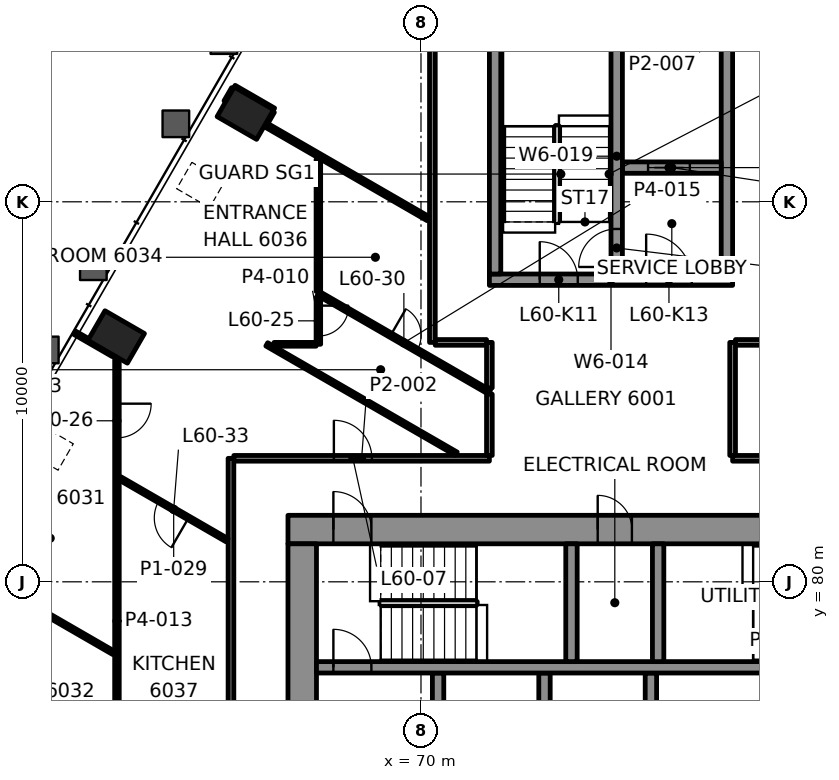
"""IFC4 building model, lengths in metres.
Left out: names, types, materials, properties, quantities, classifications, styles, units other than length and angle.
Written with IfcOpenShell. Run it as: python <this file> out.ifc"""

import sys

from ifc_helpers import new_model, si_unit, direction, frame, frame_2d, origin, origin_2d, place, context, subcontext, project, spatial, rectangle, hollow_rectangle, extrude, element, fill, save


model = new_model("IFC4")
c1 = context("Model", 3, precision=1e-05, world=origin(), true_north=direction((0.0, 1.0)))
c2 = subcontext(c1, "Body", "Model", "MODEL_VIEW")
j1 = project(units=[si_unit("LENGTHUNIT", "METRE"), si_unit("PLANEANGLEUNIT", "RADIAN")], contexts=[c1])
p1 = place(None, origin())
s1 = spatial("IfcSite", under=j1, at=p1, CompositionType="ELEMENT")
p2 = place(p1, origin())
s2 = spatial("IfcBuilding", under=s1, at=p2, CompositionType="ELEMENT")
p3 = place(p2, frame((0.0, 0.0, 256.6)))
s3 = spatial("IfcBuildingStorey", under=s2, at=p3, CompositionType="ELEMENT", Elevation=256.6)
for number, where, z_axis, x_axis in (
    (1, (65.379, 92.332, -0.0), (0.0, 0.0, 1.0), (-0.5, -0.866, 0.0)),
    (2, (61.979, 86.443, -0.0), (0.0, 0.0, 1.0), (-0.5, -0.866, 0.0)),
):
    element("IfcColumn", number, at=place(p3, frame(where, z_axis=z_axis, x_axis=x_axis)), inside=s3, PredefinedType="COLUMN", context=c2, shape_type="SweptSolid", body=[
        extrude(hollow_rectangle(XDim=0.9, YDim=1.2, WallThickness=0.06, at=origin_2d()), origin(), (0.0, 0.0, 1.0), 3.5),
    ])
p4 = place(p3, frame((66.5, 81.375, 0.0), z_axis=(0.0, 0.0, 1.0), x_axis=(1.0, 0.0, 0.0)))
e3 = element("IfcWall", 3, at=p4, inside=s3, PredefinedType="SHEAR", context=c2, shape_type="SweptSolid", body=[
    extrude(rectangle(XDim=17.0, YDim=0.75, at=frame_2d((8.5, 0.0))), origin(), (0.0, 0.0, 1.0), 3.3),
])
p5 = place(p4, frame((1.195, 0.0, 0.0)))
e4 = element("IfcOpeningElement", 4, at=p5, cuts=e3, PredefinedType="OPENING", context=c2, shape_type="SweptSolid", body=[
    extrude(rectangle(XDim=1.0, YDim=2.1, at=frame_2d((0.5, 1.05))), frame((0.0, 0.385, 0.0), z_axis=(0.0, -1.0, 0.0), x_axis=(1.0, 0.0, 0.0)), (0.0, 0.0, 1.0), 0.77),
])
p6 = place(p4, frame((15.005, 0.0, 0.0)))
e5 = element("IfcOpeningElement", 5, at=p6, cuts=e3, PredefinedType="OPENING", context=c2, shape_type="SweptSolid", body=[
    extrude(rectangle(XDim=1.0, YDim=2.1, at=frame_2d((0.5, 1.05))), frame((0.0, 0.385, 0.0), z_axis=(0.0, -1.0, 0.0), x_axis=(1.0, 0.0, 0.0)), (0.0, 0.0, 1.0), 0.77),
])
p7 = place(p4, frame((8.15, 0.0, 0.0)))
e6 = element("IfcOpeningElement", 6, at=p7, cuts=e3, PredefinedType="OPENING", context=c2, shape_type="SweptSolid", body=[
    extrude(rectangle(XDim=0.9, YDim=2.1, at=frame_2d((0.45, 1.05))), frame((0.0, 0.385, 0.0), z_axis=(0.0, -1.0, 0.0), x_axis=(1.0, 0.0, 0.0)), (0.0, 0.0, 1.0), 0.77),
])
p8 = place(p3, frame((66.875, 69.0, 0.0), z_axis=(0.0, 0.0, 1.0), x_axis=(0.0, 1.0, 0.0)))
e7 = element("IfcWall", 7, at=p8, inside=s3, PredefinedType="SHEAR", context=c2, shape_type="SweptSolid", body=[
    extrude(rectangle(XDim=12.0, YDim=0.75, at=frame_2d((6.0, 0.0))), origin(), (0.0, 0.0, 1.0), 3.3),
])
p9 = place(p8, frame((3.7, 0.0, 0.0)))
e8 = element("IfcOpeningElement", 8, at=p9, cuts=e7, PredefinedType="OPENING", context=c2, shape_type="SweptSolid", body=[
    extrude(rectangle(XDim=1.2, YDim=2.1, at=frame_2d((0.6, 1.05))), frame((0.0, 0.385, 0.0), z_axis=(0.0, -1.0, 0.0), x_axis=(1.0, 0.0, 0.0)), (0.0, 0.0, 1.0), 0.77),
])
p10 = place(p3, frame((70.45, 75.0, 0.0), z_axis=(0.0, 0.0, 1.0), x_axis=(0.0, 1.0, 0.0)))
e9 = element("IfcWall", 9, at=p10, inside=s3, PredefinedType="SHEAR", context=c2, shape_type="SweptSolid", body=[
    extrude(rectangle(XDim=2.6, YDim=0.3, at=frame_2d((1.3, 0.0))), origin(), (0.0, 0.0, 1.0), 3.3),
])
p11 = place(p10, frame((0.15, 0.0, 0.0)))
e10 = element("IfcOpeningElement", 10, at=p11, cuts=e9, PredefinedType="OPENING", context=c2, shape_type="SweptSolid", body=[
    extrude(rectangle(XDim=1.1, YDim=2.1, at=frame_2d((0.55, 1.05))), frame((0.0, 0.16, 0.0), z_axis=(0.0, -1.0, 0.0), x_axis=(1.0, 0.0, 0.0)), (0.0, 0.0, 1.0), 0.32),
])
for number, where, z_axis, x_axis in (
    (11, (73.25, 75.0, 0.0), (0.0, 0.0, 1.0), (0.0, 1.0, 0.0)),
    (12, (76.05, 75.0, 0.0), (0.0, 0.0, 1.0), (0.0, 1.0, 0.0)),
):
    element("IfcWall", number, at=place(p3, frame(where, z_axis=z_axis, x_axis=x_axis)), inside=s3, PredefinedType="SHEAR", context=c2, shape_type="SweptSolid", body=[
        extrude(rectangle(XDim=2.6, YDim=0.3, at=frame_2d((1.3, 0.0))), origin(), (0.0, 0.0, 1.0), 3.3),
    ])
p12 = place(p3, frame((67.25, 77.75, 0.0), z_axis=(0.0, 0.0, 1.0), x_axis=(1.0, 0.0, 0.0)))
e13 = element("IfcWall", 13, at=p12, inside=s3, PredefinedType="SHEAR", context=c2, shape_type="SweptSolid", body=[
    extrude(rectangle(XDim=15.5, YDim=0.3, at=frame_2d((7.75, 0.0))), origin(), (0.0, 0.0, 1.0), 3.3),
])
p13 = place(p12, frame((0.445, 0.0, 0.0)))
e14 = element("IfcOpeningElement", 14, at=p13, cuts=e13, PredefinedType="OPENING", context=c2, shape_type="SweptSolid", body=[
    extrude(rectangle(XDim=1.0, YDim=2.1, at=frame_2d((0.5, 1.05))), frame((0.0, 0.16, 0.0), z_axis=(0.0, -1.0, 0.0), x_axis=(1.0, 0.0, 0.0)), (0.0, 0.0, 1.0), 0.32),
])
for number, where, z_axis, x_axis in (
    (15, (73.96, 77.9, 0.0), (0.0, 0.0, 1.0), (0.0, 1.0, 0.0)),
    (16, (76.24, 77.9, 0.0), (0.0, 0.0, 1.0), (0.0, 1.0, 0.0)),
):
    element("IfcWall", number, at=place(p3, frame(where, z_axis=z_axis, x_axis=x_axis)), inside=s3, PredefinedType="SHEAR", context=c2, shape_type="SweptSolid", body=[
        extrude(rectangle(XDim=3.1, YDim=0.3, at=frame_2d((1.55, 0.0))), origin(), (0.0, 0.0, 1.0), 3.3),
    ])
p14 = place(p3, frame((71.8, 87.95, 0.0), z_axis=(0.0, 0.0, 1.0), x_axis=(1.0, 0.0, 0.0)))
e17 = element("IfcWall", 17, at=p14, inside=s3, PredefinedType="SHEAR", context=c2, shape_type="SweptSolid", body=[
    extrude(rectangle(XDim=6.4, YDim=0.3, at=frame_2d((3.2, 0.0))), origin(), (0.0, 0.0, 1.0), 3.3),
])
p15 = place(p14, frame((1.325, 0.0, 0.0)))
e18 = element("IfcOpeningElement", 18, at=p15, cuts=e17, PredefinedType="OPENING", context=c2, shape_type="SweptSolid", body=[
    extrude(rectangle(XDim=1.0, YDim=2.1, at=frame_2d((0.5, 1.05))), frame((0.0, 0.16, 0.0), z_axis=(0.0, -1.0, 0.0), x_axis=(1.0, 0.0, 0.0)), (0.0, 0.0, 1.0), 0.32),
])
p16 = place(p14, frame((4.125, 0.0, 0.0)))
e19 = element("IfcOpeningElement", 19, at=p16, cuts=e17, PredefinedType="OPENING", context=c2, shape_type="SweptSolid", body=[
    extrude(rectangle(XDim=1.2, YDim=2.1, at=frame_2d((0.6, 1.05))), frame((0.0, 0.16, 0.0), z_axis=(0.0, -1.0, 0.0), x_axis=(1.0, 0.0, 0.0)), (0.0, 0.0, 1.0), 0.32),
])
for number, where, z_axis, x_axis in (
    (20, (71.95, 88.1, 0.0), (0.0, 0.0, 1.0), (0.0, 1.0, 0.0)),
    (21, (78.05, 88.1, 0.0), (0.0, 0.0, 1.0), (0.0, 1.0, 0.0)),
):
    element("IfcWall", number, at=place(p3, frame(where, z_axis=z_axis, x_axis=x_axis)), inside=s3, PredefinedType="SHEAR", context=c2, shape_type="SweptSolid", body=[
        extrude(rectangle(XDim=6.2, YDim=0.3, at=frame_2d((3.1, 0.0))), origin(), (0.0, 0.0, 1.0), 3.3),
    ])
p17 = place(p3, frame((75.3, 90.9, 0.0), z_axis=(0.0, 0.0, 1.0), x_axis=(1.0, 0.0, 0.0)))
e22 = element("IfcWall", 22, at=p17, inside=s3, PredefinedType="SHEAR", context=c2, shape_type="SweptSolid", body=[
    extrude(rectangle(XDim=2.6, YDim=0.3, at=frame_2d((1.3, 0.0))), origin(), (0.0, 0.0, 1.0), 3.3),
])
p18 = place(p17, frame((0.675, 0.0, 0.0)))
e23 = element("IfcOpeningElement", 23, at=p18, cuts=e22, PredefinedType="OPENING", context=c2, shape_type="SweptSolid", body=[
    extrude(rectangle(XDim=1.1, YDim=2.1, at=frame_2d((0.55, 1.05))), frame((0.0, 0.16, 0.0), z_axis=(0.0, -1.0, 0.0), x_axis=(1.0, 0.0, 0.0)), (0.0, 0.0, 1.0), 0.32),
])
p19 = place(p3, frame((75.15, 88.1, 0.0), z_axis=(0.0, 0.0, 1.0), x_axis=(0.0, 1.0, 0.0)))
e24 = element("IfcWall", 24, at=p19, inside=s3, PredefinedType="SHEAR", context=c2, shape_type="SweptSolid", body=[
    extrude(rectangle(XDim=6.2, YDim=0.3, at=frame_2d((3.1, 0.0))), origin(), (0.0, 0.0, 1.0), 3.3),
])
p20 = place(p19, frame((0.185, 0.0, 0.0)))
e25 = element("IfcOpeningElement", 25, at=p20, cuts=e24, PredefinedType="OPENING", context=c2, shape_type="SweptSolid", body=[
    extrude(rectangle(XDim=1.0, YDim=2.1, at=frame_2d((0.5, 1.05))), frame((0.0, 0.16, 0.0), z_axis=(0.0, -1.0, 0.0), x_axis=(1.0, 0.0, 0.0)), (0.0, 0.0, 1.0), 0.32),
])
p21 = place(p3, frame((65.075, 83.25, 0.0), z_axis=(0.0, 0.0, 1.0), x_axis=(1.0, 0.0, 0.0)))
e26 = element("IfcWall", 26, at=p21, inside=s3, PredefinedType="PARTITIONING", context=c2, shape_type="SweptSolid", body=[
    extrude(rectangle(XDim=6.725, YDim=0.15, at=frame_2d((3.362, 0.0))), origin(), (0.0, 0.0, 1.0), 2.7),
])
p22 = place(p21, frame((2.632, 0.0, 0.0)))
e27 = element("IfcOpeningElement", 27, at=p22, cuts=e26, PredefinedType="OPENING", context=c2, shape_type="SweptSolid", body=[
    extrude(rectangle(XDim=1.0, YDim=2.1, at=frame_2d((0.5, 1.05))), frame((0.0, 0.085, 0.0), z_axis=(0.0, -1.0, 0.0), x_axis=(1.0, 0.0, 0.0)), (0.0, 0.0, 1.0), 0.17),
])
p23 = place(p3, frame((78.2, 83.25, 0.0), z_axis=(0.0, 0.0, 1.0), x_axis=(1.0, 0.0, 0.0)))
e28 = element("IfcWall", 28, at=p23, inside=s3, PredefinedType="PARTITIONING", context=c2, shape_type="SweptSolid", body=[
    extrude(rectangle(XDim=6.725, YDim=0.15, at=frame_2d((3.362, 0.0))), origin(), (0.0, 0.0, 1.0), 2.7),
])
p24 = place(p23, frame((2.862, 0.0, 0.0)))
e29 = element("IfcOpeningElement", 29, at=p24, cuts=e28, PredefinedType="OPENING", context=c2, shape_type="SweptSolid", body=[
    extrude(rectangle(XDim=1.0, YDim=2.1, at=frame_2d((0.5, 1.05))), frame((0.0, 0.085, 0.0), z_axis=(0.0, -1.0, 0.0), x_axis=(1.0, 0.0, 0.0)), (0.0, 0.0, 1.0), 0.17),
])
p25 = place(p3, frame((66.133, 86.25, 0.0), z_axis=(0.0, 0.0, 1.0), x_axis=(1.0, 0.0, 0.0)))
e30 = element("IfcWall", 30, at=p25, inside=s3, PredefinedType="PARTITIONING", context=c2, shape_type="SweptSolid", body=[
    extrude(rectangle(XDim=1.106, YDim=0.1, at=frame_2d((0.553, 0.0))), origin(), (0.0, 0.0, 1.0), 2.7),
])
p26 = place(p3, frame((70.375, 86.3, 0.0), z_axis=(0.0, 0.0, 1.0), x_axis=(1.0, 0.0, 0.0)))
e31 = element("IfcWall", 31, at=p26, inside=s3, PredefinedType="PARTITIONING", context=c2, shape_type="SweptSolid", body=[
    extrude(rectangle(XDim=1.35, YDim=0.15, at=frame_2d((0.675, 0.0))), origin(), (0.0, 0.0, 1.0), 2.7),
])
p27 = place(p3, frame((78.275, 86.3, 0.0), z_axis=(0.0, 0.0, 1.0), x_axis=(1.0, 0.0, 0.0)))
e32 = element("IfcWall", 32, at=p27, inside=s3, PredefinedType="PARTITIONING", context=c2, shape_type="SweptSolid", body=[
    extrude(rectangle(XDim=1.35, YDim=0.15, at=frame_2d((0.675, 0.0))), origin(), (0.0, 0.0, 1.0), 2.7),
])
p28 = place(p3, frame((65.929, 92.085, 0.0), z_axis=(0.0, 0.0, 1.0), x_axis=(0.49970167553, 0.866197573001, 0.0)))
e33 = element("IfcWall", 33, at=p28, inside=s3, PredefinedType="PARTITIONING", context=c2, shape_type="SweptSolid", body=[
    extrude(rectangle(XDim=0.339, YDim=0.1, at=frame_2d((0.169, 0.0))), origin(), (0.0, 0.0, 1.0), 2.7),
])
p29 = place(p3, frame((64.86, 92.633, 0.0), z_axis=(0.0, 0.0, 1.0), x_axis=(0.500481453673, 0.865747257882, 0.0)))
e34 = element("IfcWall", 34, at=p29, inside=s3, PredefinedType="PARTITIONING", context=c2, shape_type="SweptSolid", body=[
    extrude(rectangle(XDim=0.399, YDim=0.1, at=frame_2d((0.199, 0.0))), origin(), (0.0, 0.0, 1.0), 2.7),
])
p30 = place(p3, frame((78.2, 83.325, 0.0), z_axis=(0.0, 0.0, 1.0), x_axis=(0.0, 1.0, 0.0)))
e35 = element("IfcWall", 35, at=p30, inside=s3, PredefinedType="PARTITIONING", context=c2, shape_type="SweptSolid", body=[
    extrude(rectangle(XDim=2.975, YDim=0.15, at=frame_2d((1.488, 0.0))), origin(), (0.0, 0.0, 1.0), 2.622),
])
p31 = place(p3, frame((71.8, 83.325, 0.0), z_axis=(0.0, 0.0, 1.0), x_axis=(0.0, 1.0, 0.0)))
e36 = element("IfcWall", 36, at=p31, inside=s3, PredefinedType="PARTITIONING", context=c2, shape_type="SweptSolid", body=[
    extrude(rectangle(XDim=1.614, YDim=0.15, at=frame_2d((0.807, 0.0))), origin(), (0.0, 0.0, 1.0), 2.622),
])
p32 = place(p3, frame((70.3, 86.3, 0.0), z_axis=(0.0, 0.0, 1.0), x_axis=(0.0, 1.0, 0.0)))
e37 = element("IfcWall", 37, at=p32, inside=s3, PredefinedType="PARTITIONING", context=c2, shape_type="SweptSolid", body=[
    extrude(rectangle(XDim=9.8, YDim=0.15, at=frame_2d((4.9, 0.0))), origin(), (0.0, 0.0, 1.0), 2.7),
])
p33 = place(p3, frame((67.3, 87.485, 0.0), z_axis=(0.0, 0.0, 1.0), x_axis=(0.0, -1.0, 0.0)))
e38 = element("IfcWall", 38, at=p33, inside=s3, PredefinedType="PARTITIONING", context=c2, shape_type="SweptSolid", body=[
    extrude(rectangle(XDim=1.234, YDim=0.12, at=frame_2d((0.617, 0.0))), origin(), (0.0, 0.0, 1.0), 2.622),
])
p34 = place(p33, frame((0.217, 0.0, 0.0)))
e39 = element("IfcOpeningElement", 39, at=p34, cuts=e38, PredefinedType="OPENING", context=c2, shape_type="SweptSolid", body=[
    extrude(rectangle(XDim=0.8, YDim=2.1, at=frame_2d((0.4, 1.05))), frame((0.0, 0.07, 0.0), z_axis=(0.0, -1.0, 0.0), x_axis=(1.0, 0.0, 0.0)), (0.0, 0.0, 1.0), 0.14),
])
p35 = place(p3, frame((65.0, 70.352, 0.0), z_axis=(0.0, 0.0, 1.0), x_axis=(0.0, 1.0, 0.0)))
e40 = element("IfcWall", 40, at=p35, inside=s3, PredefinedType="PARTITIONING", context=c2, shape_type="SweptSolid", body=[
    extrude(rectangle(XDim=12.897, YDim=0.15, at=frame_2d((6.449, 0.0))), origin(), (0.0, 0.0, 1.0), 2.7),
])
p36 = place(p3, frame((62.0, 85.912, 0.0), z_axis=(0.0, 0.0, 1.0), x_axis=(0.0, -1.0, 0.0)))
e41 = element("IfcWall", 41, at=p36, inside=s3, PredefinedType="PARTITIONING", context=c2, shape_type="SweptSolid", body=[
    extrude(rectangle(XDim=13.888, YDim=0.12, at=frame_2d((6.944, 0.0))), origin(), (0.0, 0.0, 1.0), 2.7),
])
p37 = place(p36, frame((1.224, 0.0, 0.0)))
e42 = element("IfcOpeningElement", 42, at=p37, cuts=e41, PredefinedType="OPENING", context=c2, shape_type="SweptSolid", body=[
    extrude(rectangle(XDim=0.9, YDim=2.1, at=frame_2d((0.45, 1.05))), frame((0.0, 0.07, 0.0), z_axis=(0.0, -1.0, 0.0), x_axis=(1.0, 0.0, 0.0)), (0.0, 0.0, 1.0), 0.14),
])
p38 = place(p36, frame((9.49, 0.0, 0.0)))
e43 = element("IfcOpeningElement", 43, at=p38, cuts=e41, PredefinedType="OPENING", context=c2, shape_type="SweptSolid", body=[
    extrude(rectangle(XDim=0.9, YDim=2.1, at=frame_2d((0.45, 1.05))), frame((0.0, 0.07, 0.0), z_axis=(0.0, -1.0, 0.0), x_axis=(1.0, 0.0, 0.0)), (0.0, 0.0, 1.0), 0.14),
])
p39 = place(p36, frame((12.466, 0.0, 0.0)))
e44 = element("IfcOpeningElement", 44, at=p39, cuts=e41, PredefinedType="OPENING", context=c2, shape_type="SweptSolid", body=[
    extrude(rectangle(XDim=0.8, YDim=2.1, at=frame_2d((0.4, 1.05))), frame((0.0, 0.07, 0.0), z_axis=(0.0, -1.0, 0.0), x_axis=(1.0, 0.0, 0.0)), (0.0, 0.0, 1.0), 0.14),
])
p40 = place(p3, frame((66.124, 92.422, 0.0), z_axis=(0.0, 0.0, 1.0), x_axis=(-0.865978732077, 0.500080829057, 0.0)))
e45 = element("IfcWall", 45, at=p40, inside=s3, PredefinedType="PARTITIONING", context=c2, shape_type="SweptSolid", body=[
    extrude(rectangle(XDim=1.199, YDim=0.1, at=frame_2d((0.6, 0.0))), origin(), (0.0, 0.0, 1.0), 2.688),
])
p41 = place(p3, frame((70.19, 89.555, 0.0), z_axis=(0.0, 0.0, 1.0), x_axis=(-0.866036249428, 0.499981214323, 0.0)))
e46 = element("IfcWall", 46, at=p41, inside=s3, PredefinedType="PARTITIONING", context=c2, shape_type="SweptSolid", body=[
    extrude(rectangle(XDim=4.955, YDim=0.12, at=frame_2d((2.478, 0.0))), origin(), (0.0, 0.0, 1.0), 2.7),
])
p42 = place(p3, frame((67.3, 87.589, 0.0), z_axis=(0.0, 0.0, 1.0), x_axis=(0.866019710441, -0.50000986103, 0.0)))
e47 = element("IfcWall", 47, at=p42, inside=s3, PredefinedType="PARTITIONING", context=c2, shape_type="SweptSolid", body=[
    extrude(rectangle(XDim=5.196, YDim=0.12, at=frame_2d((2.598, 0.0))), origin(), (0.0, 0.0, 1.0), 2.7),
])
p43 = place(p42, frame((2.198, 0.0, 0.0)))
e48 = element("IfcOpeningElement", 48, at=p43, cuts=e47, PredefinedType="OPENING", context=c2, shape_type="SweptSolid", body=[
    extrude(rectangle(XDim=0.8, YDim=2.1, at=frame_2d((0.4, 1.05))), frame((0.0, 0.07, 0.0), z_axis=(0.0, -1.0, 0.0), x_axis=(1.0, 0.0, 0.0)), (0.0, 0.0, 1.0), 0.14),
])
p44 = place(p3, frame((70.929, 83.37, 0.0), z_axis=(0.0, 0.0, 1.0), x_axis=(-0.866032366698, 0.499987939687, 0.0)))
e49 = element("IfcWall", 49, at=p44, inside=s3, PredefinedType="PARTITIONING", context=c2, shape_type="SweptSolid", body=[
    extrude(rectangle(XDim=5.758, YDim=0.1, at=frame_2d((2.879, 0.0))), origin(), (0.0, 0.0, 1.0), 2.7),
])
p45 = place(p3, frame((61.901, 85.969, 0.0), z_axis=(0.0, 0.0, 1.0), x_axis=(-0.866102146699, 0.499867053809, 0.0)))
e50 = element("IfcWall", 50, at=p45, inside=s3, PredefinedType="PARTITIONING", context=c2, shape_type="SweptSolid", body=[
    extrude(rectangle(XDim=1.169, YDim=0.1, at=frame_2d((0.584, 0.0))), origin(), (0.0, 0.0, 1.0), 2.688),
])
p46 = place(p3, frame((64.899, 81.094, 0.0), z_axis=(0.0, 0.0, 1.0), x_axis=(-0.866032882975, 0.499987045439, 0.0)))
e51 = element("IfcWall", 51, at=p46, inside=s3, PredefinedType="PARTITIONING", context=c2, shape_type="SweptSolid", body=[
    extrude(rectangle(XDim=3.248, YDim=0.1, at=frame_2d((1.624, 0.0))), origin(), (0.0, 0.0, 1.0), 2.7),
])
p47 = place(p46, frame((1.174, 0.0, 0.0)))
e52 = element("IfcOpeningElement", 52, at=p47, cuts=e51, PredefinedType="OPENING", context=c2, shape_type="SweptSolid", body=[
    extrude(rectangle(XDim=0.9, YDim=2.1, at=frame_2d((0.45, 1.05))), frame((0.0, 0.06, 0.0), z_axis=(0.0, -1.0, 0.0), x_axis=(1.0, 0.0, 0.0)), (0.0, 0.0, 1.0), 0.12),
])
p48 = place(p3, frame((61.914, 78.129, 0.0), z_axis=(0.0, 0.0, 1.0), x_axis=(-0.866011380966, 0.500024287448, 0.0)))
e53 = element("IfcWall", 53, at=p48, inside=s3, PredefinedType="PARTITIONING", context=c2, shape_type="SweptSolid", body=[
    extrude(rectangle(XDim=3.501, YDim=0.1, at=frame_2d((1.75, 0.0))), origin(), (0.0, 0.0, 1.0), 2.7),
])
p49 = place(p3, frame((71.8, 85.103, 0.0), z_axis=(0.0, 0.0, 1.0), x_axis=(0.0, 1.0, 0.0)))
e54 = element("IfcWall", 54, at=p49, inside=s3, PredefinedType="PARTITIONING", context=c2, shape_type="SweptSolid", body=[
    extrude(rectangle(XDim=1.197, YDim=0.15, at=frame_2d((0.598, 0.0))), origin(), (0.0, 0.0, 1.0), 2.7),
])
p50 = place(p3, frame((67.3, 87.641, 0.0), z_axis=(0.0, 0.0, 1.0), x_axis=(0.0, 1.0, 0.0)))
e55 = element("IfcWall", 55, at=p50, inside=s3, PredefinedType="PARTITIONING", context=c2, shape_type="SweptSolid", body=[
    extrude(rectangle(XDim=3.473, YDim=0.12, at=frame_2d((1.737, 0.0))), origin(), (0.0, 0.0, 1.0), 2.7),
])
p51 = place(p22, origin())
e56 = element("IfcDoor", 56, at=p51, inside=s3, OperationType="SINGLE_SWING_LEFT", PredefinedType="DOOR", context=c2, shape_type="SweptSolid", body=[
    extrude(rectangle(XDim=1.0, YDim=2.1, at=frame_2d((0.5, 1.05))), frame((0.0, 0.025, 0.0), z_axis=(0.0, -1.0, 0.0), x_axis=(1.0, 0.0, 0.0)), (0.0, 0.0, 1.0), 0.05),
])
fill(e27, e56)
p52 = place(p34, origin())
e57 = element("IfcDoor", 57, at=p52, inside=s3, OperationType="SINGLE_SWING_LEFT", PredefinedType="DOOR", context=c2, shape_type="SweptSolid", body=[
    extrude(rectangle(XDim=0.8, YDim=2.1, at=frame_2d((0.4, 1.05))), frame((0.0, 0.025, 0.0), z_axis=(0.0, -1.0, 0.0), x_axis=(1.0, 0.0, 0.0)), (0.0, 0.0, 1.0), 0.05),
])
fill(e39, e57)
p53 = place(p37, origin())
e58 = element("IfcDoor", 58, at=p53, inside=s3, OperationType="SINGLE_SWING_RIGHT", PredefinedType="DOOR", context=c2, shape_type="SweptSolid", body=[
    extrude(rectangle(XDim=0.9, YDim=2.1, at=frame_2d((0.45, 1.05))), frame((0.0, 0.025, 0.0), z_axis=(0.0, -1.0, 0.0), x_axis=(1.0, 0.0, 0.0)), (0.0, 0.0, 1.0), 0.05),
])
fill(e42, e58)
p54 = place(p43, origin())
e59 = element("IfcDoor", 59, at=p54, inside=s3, OperationType="SINGLE_SWING_LEFT", PredefinedType="DOOR", context=c2, shape_type="SweptSolid", body=[
    extrude(rectangle(XDim=0.8, YDim=2.1, at=frame_2d((0.4, 1.05))), frame((0.0, 0.025, 0.0), z_axis=(0.0, -1.0, 0.0), x_axis=(1.0, 0.0, 0.0)), (0.0, 0.0, 1.0), 0.05),
])
fill(e48, e59)
p55 = place(p47, origin())
e60 = element("IfcDoor", 60, at=p55, inside=s3, OperationType="SINGLE_SWING_RIGHT", PredefinedType="DOOR", context=c2, shape_type="SweptSolid", body=[
    extrude(rectangle(XDim=0.9, YDim=2.1, at=frame_2d((0.45, 1.05))), frame((0.0, 0.025, 0.0), z_axis=(0.0, -1.0, 0.0), x_axis=(1.0, 0.0, 0.0)), (0.0, 0.0, 1.0), 0.05),
])
fill(e52, e60)
p56 = place(p18, origin())
e61 = element("IfcDoor", 61, at=p56, inside=s3, OperationType="DOUBLE_DOOR_SLIDING", PredefinedType="DOOR", context=c2, shape_type="SweptSolid", body=[
    extrude(rectangle(XDim=1.1, YDim=2.1, at=frame_2d((0.55, 1.05))), frame((0.0, 0.025, 0.0), z_axis=(0.0, -1.0, 0.0), x_axis=(1.0, 0.0, 0.0)), (0.0, 0.0, 1.0), 0.05),
])
fill(e23, e61)
p57 = place(p13, origin())
e62 = element("IfcDoor", 62, at=p57, inside=s3, OperationType="SINGLE_SWING_LEFT", PredefinedType="DOOR", context=c2, shape_type="SweptSolid", body=[
    extrude(rectangle(XDim=1.0, YDim=2.1, at=frame_2d((0.5, 1.05))), frame((0.0, 0.025, 0.0), z_axis=(0.0, -1.0, 0.0), x_axis=(1.0, 0.0, 0.0)), (0.0, 0.0, 1.0), 0.05),
])
fill(e14, e62)
p58 = place(p5, origin())
e63 = element("IfcDoor", 63, at=p58, inside=s3, OperationType="SINGLE_SWING_RIGHT", PredefinedType="DOOR", context=c2, shape_type="SweptSolid", body=[
    extrude(rectangle(XDim=1.0, YDim=2.1, at=frame_2d((0.5, 1.05))), frame((0.0, 0.095, 0.0), z_axis=(0.0, -1.0, 0.0), x_axis=(1.0, 0.0, 0.0)), (0.0, 0.0, 1.0), 0.19),
])
fill(e4, e63)
p59 = place(p15, origin())
e64 = element("IfcDoor", 64, at=p59, inside=s3, OperationType="SINGLE_SWING_RIGHT", PredefinedType="DOOR", context=c2, shape_type="SweptSolid", body=[
    extrude(rectangle(XDim=1.0, YDim=2.1, at=frame_2d((0.5, 1.05))), frame((0.0, 0.025, 0.0), z_axis=(0.0, -1.0, 0.0), x_axis=(1.0, 0.0, 0.0)), (0.0, 0.0, 1.0), 0.05),
])
fill(e18, e64)
p60 = place(p20, origin())
e65 = element("IfcDoor", 65, at=p60, inside=s3, OperationType="SINGLE_SWING_LEFT", PredefinedType="DOOR", context=c2, shape_type="SweptSolid", body=[
    extrude(rectangle(XDim=1.0, YDim=2.1, at=frame_2d((0.5, 1.05))), frame((0.0, 0.025, 0.0), z_axis=(0.0, -1.0, 0.0), x_axis=(1.0, 0.0, 0.0)), (0.0, 0.0, 1.0), 0.05),
])
fill(e25, e65)
p61 = place(p16, origin())
e66 = element("IfcDoor", 66, at=p61, inside=s3, OperationType="SINGLE_SWING_RIGHT", PredefinedType="DOOR", context=c2, shape_type="SweptSolid", body=[
    extrude(rectangle(XDim=1.2, YDim=2.1, at=frame_2d((0.6, 1.05))), frame((0.0, 0.025, 0.0), z_axis=(0.0, -1.0, 0.0), x_axis=(1.0, 0.0, 0.0)), (0.0, 0.0, 1.0), 0.05),
])
fill(e19, e66)
p62 = place(p7, origin())
e67 = element("IfcDoor", 67, at=p62, inside=s3, OperationType="SINGLE_SWING_RIGHT", PredefinedType="DOOR", context=c2, shape_type="SweptSolid", body=[
    extrude(rectangle(XDim=0.9, YDim=2.1, at=frame_2d((0.45, 1.05))), frame((0.0, 0.095, 0.0), z_axis=(0.0, -1.0, 0.0), x_axis=(1.0, 0.0, 0.0)), (0.0, 0.0, 1.0), 0.19),
])
fill(e6, e67)
save(model, sys.argv[1])
